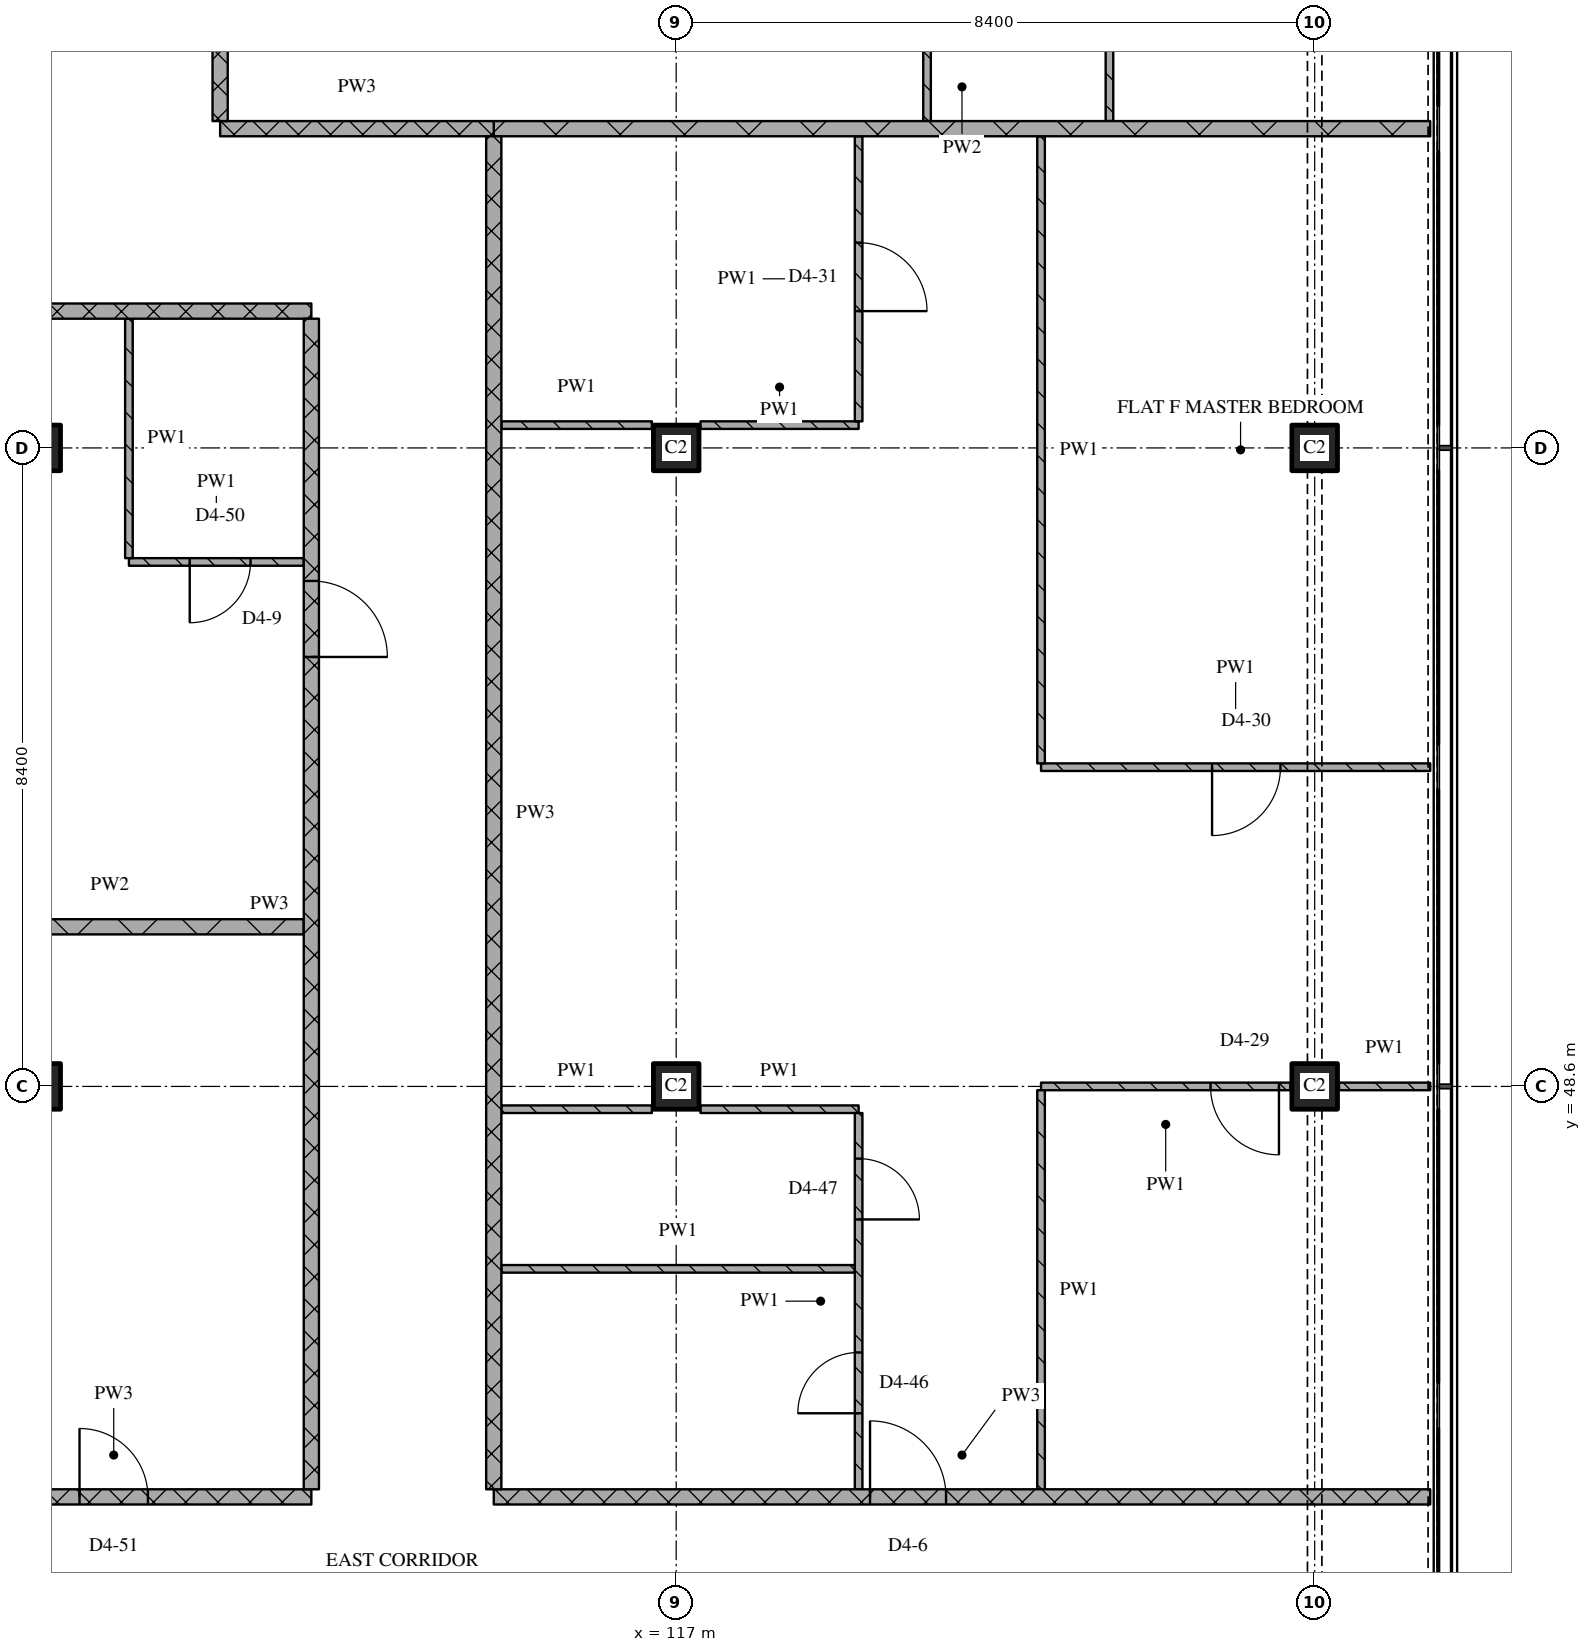
"""IFC4 building model, lengths in metres.
Left out: names, types, materials, properties, quantities, classifications, styles, units other than length and angle.
Written with IfcOpenShell. Run it as: python <this file> out.ifc"""

import sys

from ifc_helpers import new_model, si_unit, direction, frame, frame_2d, origin, origin_2d, place, context, subcontext, project, spatial, rectangle, extrude, element, fill, save


model = new_model("IFC4")
c1 = context("Model", 3, precision=1e-05, world=origin(), true_north=direction((0.0, 1.0)))
c2 = subcontext(c1, "Body", "Model", "MODEL_VIEW")
j1 = project(units=[si_unit("LENGTHUNIT", "METRE"), si_unit("PLANEANGLEUNIT", "RADIAN")], contexts=[c1])
p1 = place(None, origin())
s1 = spatial("IfcSite", under=j1, at=p1, CompositionType="ELEMENT")
p2 = place(p1, origin())
s2 = spatial("IfcBuilding", under=s1, at=p2, CompositionType="ELEMENT")
p3 = place(p2, frame((0.0, 0.0, 245.1)))
s3 = spatial("IfcBuildingStorey", under=s2, at=p3, CompositionType="ELEMENT", Elevation=245.1)
for number, where, z_axis, x_axis in (
    (1, (108.6, 48.6, 0.0), (0.0, 0.0, 1.0), (1.0, 0.0, 0.0)),
    (2, (108.6, 57.0, 0.0), (0.0, 0.0, 1.0), (1.0, 0.0, 0.0)),
    (3, (117.0, 48.6, 0.0), (0.0, 0.0, 1.0), (1.0, 0.0, 0.0)),
    (4, (117.0, 57.0, 0.0), (0.0, 0.0, 1.0), (1.0, 0.0, 0.0)),
    (5, (125.4, 48.6, 0.0), (0.0, 0.0, 1.0), (1.0, 0.0, 0.0)),
    (6, (125.4, 57.0, 0.0), (0.0, 0.0, 1.0), (1.0, 0.0, 0.0)),
):
    element("IfcColumn", number, at=place(p3, frame(where, z_axis=z_axis, x_axis=x_axis)), inside=s3, PredefinedType="COLUMN", context=c2, shape_type="SweptSolid", body=[
        extrude(rectangle(XDim=0.6, YDim=0.6, at=origin_2d()), origin(), (0.0, 0.0, 1.0), 3.6),
    ])
p4 = place(p3, frame((107.0, 43.2, 0.0), z_axis=(0.0, 0.0, 1.0), x_axis=(1.0, 0.0, 0.0)))
e7 = element("IfcWall", 7, at=p4, inside=s3, PredefinedType="PARTITIONING", context=c2, shape_type="SweptSolid", body=[
    extrude(rectangle(XDim=5.2, YDim=0.2, at=frame_2d((2.6, 0.0))), origin(), (0.0, 0.0, 1.0), 3.32),
])
p5 = place(p4, frame((2.15, 0.0, 0.0)))
e8 = element("IfcOpeningElement", 8, at=p5, cuts=e7, PredefinedType="OPENING", context=c2, shape_type="SweptSolid", body=[
    extrude(rectangle(XDim=0.9, YDim=2.1, at=frame_2d((0.45, 1.05))), frame((0.0, 0.11, 0.0), z_axis=(0.0, -1.0, 0.0), x_axis=(1.0, 0.0, 0.0)), (0.0, 0.0, 1.0), 0.22),
])
p6 = place(p3, frame((114.6, 43.2, 0.0), z_axis=(0.0, 0.0, 1.0), x_axis=(1.0, 0.0, 0.0)))
e9 = element("IfcWall", 9, at=p6, inside=s3, PredefinedType="PARTITIONING", context=c2, shape_type="SweptSolid", body=[
    extrude(rectangle(XDim=12.32, YDim=0.2, at=frame_2d((6.16, 0.0))), origin(), (0.0, 0.0, 1.0), 3.32),
])
p7 = place(p6, frame((4.95, 0.0, 0.0)))
e10 = element("IfcOpeningElement", 10, at=p7, cuts=e9, PredefinedType="OPENING", context=c2, shape_type="SweptSolid", body=[
    extrude(rectangle(XDim=1.0, YDim=2.1, at=frame_2d((0.5, 1.05))), frame((0.0, 0.11, 0.0), z_axis=(0.0, -1.0, 0.0), x_axis=(1.0, 0.0, 0.0)), (0.0, 0.0, 1.0), 0.22),
])
p8 = place(p3, frame((114.7, 46.2, 0.0), z_axis=(0.0, 0.0, 1.0), x_axis=(1.0, 0.0, 0.0)))
e11 = element("IfcWall", 11, at=p8, inside=s3, PredefinedType="PARTITIONING", context=c2, shape_type="SweptSolid", body=[
    extrude(rectangle(XDim=4.65, YDim=0.1, at=frame_2d((2.325, 0.0))), origin(), (0.0, 0.0, 1.0), 3.32),
])
p9 = place(p3, frame((114.7, 48.3, 0.0), z_axis=(0.0, 0.0, 1.0), x_axis=(1.0, 0.0, 0.0)))
e12 = element("IfcWall", 12, at=p9, inside=s3, PredefinedType="PARTITIONING", context=c2, shape_type="SweptSolid", body=[
    extrude(rectangle(XDim=1.98, YDim=0.1, at=frame_2d((0.99, 0.0))), origin(), (0.0, 0.0, 1.0), 3.32),
])
p10 = place(p3, frame((117.32, 48.3, 0.0), z_axis=(0.0, 0.0, 1.0), x_axis=(1.0, 0.0, 0.0)))
e13 = element("IfcWall", 13, at=p10, inside=s3, PredefinedType="PARTITIONING", context=c2, shape_type="SweptSolid", body=[
    extrude(rectangle(XDim=2.08, YDim=0.1, at=frame_2d((1.04, 0.0))), origin(), (0.0, 0.0, 1.0), 3.32),
])
p11 = place(p3, frame((125.08, 48.6, 0.0), z_axis=(0.0, 0.0, 1.0), x_axis=(-1.0, 0.0, 0.0)))
e14 = element("IfcWall", 14, at=p11, inside=s3, PredefinedType="PARTITIONING", context=c2, shape_type="SweptSolid", body=[
    extrude(rectangle(XDim=3.28, YDim=0.1, at=frame_2d((1.64, 0.0))), origin(), (0.0, 0.0, 1.0), 3.32),
])
p12 = place(p11, frame((0.15, 0.0, 0.0)))
e15 = element("IfcOpeningElement", 15, at=p12, cuts=e14, PredefinedType="OPENING", context=c2, shape_type="SweptSolid", body=[
    extrude(rectangle(XDim=0.9, YDim=2.1, at=frame_2d((0.45, 1.05))), frame((0.0, 0.06, 0.0), z_axis=(0.0, -1.0, 0.0), x_axis=(1.0, 0.0, 0.0)), (0.0, 0.0, 1.0), 0.12),
])
p13 = place(p3, frame((125.72, 48.6, 0.0), z_axis=(0.0, 0.0, 1.0), x_axis=(1.0, 0.0, 0.0)))
e16 = element("IfcWall", 16, at=p13, inside=s3, PredefinedType="PARTITIONING", context=c2, shape_type="SweptSolid", body=[
    extrude(rectangle(XDim=1.2, YDim=0.1, at=frame_2d((0.6, 0.0))), origin(), (0.0, 0.0, 1.0), 3.32),
])
p14 = place(p3, frame((107.0, 50.7, 0.0), z_axis=(0.0, 0.0, 1.0), x_axis=(1.0, 0.0, 0.0)))
e17 = element("IfcWall", 17, at=p14, inside=s3, PredefinedType="PARTITIONING", context=c2, shape_type="SweptSolid", body=[
    extrude(rectangle(XDim=5.1, YDim=0.2, at=frame_2d((2.55, 0.0))), origin(), (0.0, 0.0, 1.0), 3.32),
])
p15 = place(p3, frame((121.8, 52.8, 0.0), z_axis=(0.0, 0.0, 1.0), x_axis=(1.0, 0.0, 0.0)))
e18 = element("IfcWall", 18, at=p15, inside=s3, PredefinedType="PARTITIONING", context=c2, shape_type="SweptSolid", body=[
    extrude(rectangle(XDim=5.12, YDim=0.1, at=frame_2d((2.56, 0.0))), origin(), (0.0, 0.0, 1.0), 3.32),
])
p16 = place(p15, frame((2.25, 0.0, 0.0)))
e19 = element("IfcOpeningElement", 19, at=p16, cuts=e18, PredefinedType="OPENING", context=c2, shape_type="SweptSolid", body=[
    extrude(rectangle(XDim=0.9, YDim=2.1, at=frame_2d((0.45, 1.05))), frame((0.0, 0.06, 0.0), z_axis=(0.0, -1.0, 0.0), x_axis=(1.0, 0.0, 0.0)), (0.0, 0.0, 1.0), 0.12),
])
p17 = place(p3, frame((109.8, 55.5, 0.0), z_axis=(0.0, 0.0, 1.0), x_axis=(1.0, 0.0, 0.0)))
e20 = element("IfcWall", 20, at=p17, inside=s3, PredefinedType="PARTITIONING", context=c2, shape_type="SweptSolid", body=[
    extrude(rectangle(XDim=2.3, YDim=0.1, at=frame_2d((1.15, 0.0))), origin(), (0.0, 0.0, 1.0), 3.32),
])
p18 = place(p17, frame((0.8, 0.0, 0.0)))
e21 = element("IfcOpeningElement", 21, at=p18, cuts=e20, PredefinedType="OPENING", context=c2, shape_type="SweptSolid", body=[
    extrude(rectangle(XDim=0.8, YDim=2.1, at=frame_2d((0.4, 1.05))), frame((0.0, 0.06, 0.0), z_axis=(0.0, -1.0, 0.0), x_axis=(1.0, 0.0, 0.0)), (0.0, 0.0, 1.0), 0.12),
])
p19 = place(p3, frame((114.7, 57.3, 0.0), z_axis=(0.0, 0.0, 1.0), x_axis=(1.0, 0.0, 0.0)))
e22 = element("IfcWall", 22, at=p19, inside=s3, PredefinedType="PARTITIONING", context=c2, shape_type="SweptSolid", body=[
    extrude(rectangle(XDim=1.98, YDim=0.1, at=frame_2d((0.99, 0.0))), origin(), (0.0, 0.0, 1.0), 3.32),
])
p20 = place(p3, frame((117.32, 57.3, 0.0), z_axis=(0.0, 0.0, 1.0), x_axis=(1.0, 0.0, 0.0)))
e23 = element("IfcWall", 23, at=p20, inside=s3, PredefinedType="PARTITIONING", context=c2, shape_type="SweptSolid", body=[
    extrude(rectangle(XDim=2.08, YDim=0.1, at=frame_2d((1.04, 0.0))), origin(), (0.0, 0.0, 1.0), 3.32),
])
p21 = place(p3, frame((101.4, 58.8, 0.0), z_axis=(0.0, 0.0, 1.0), x_axis=(1.0, 0.0, 0.0)))
e24 = element("IfcWall", 24, at=p21, inside=s3, PredefinedType="PARTITIONING", context=c2, shape_type="SweptSolid", body=[
    extrude(rectangle(XDim=10.8, YDim=0.2, at=frame_2d((5.4, 0.0))), origin(), (0.0, 0.0, 1.0), 3.32),
])
p22 = place(p3, frame((111.0, 61.2, 0.0), z_axis=(0.0, 0.0, 1.0), x_axis=(1.0, 0.0, 0.0)))
e25 = element("IfcWall", 25, at=p22, inside=s3, PredefinedType="PARTITIONING", context=c2, shape_type="SweptSolid", body=[
    extrude(rectangle(XDim=3.6, YDim=0.2, at=frame_2d((1.8, 0.0))), origin(), (0.0, 0.0, 1.0), 3.32),
])
p23 = place(p3, frame((114.6, 61.2, 0.0), z_axis=(0.0, 0.0, 1.0), x_axis=(1.0, 0.0, 0.0)))
e26 = element("IfcWall", 26, at=p23, inside=s3, PredefinedType="PARTITIONING", context=c2, shape_type="SweptSolid", body=[
    extrude(rectangle(XDim=12.32, YDim=0.2, at=frame_2d((6.16, 0.0))), origin(), (0.0, 0.0, 1.0), 3.32),
])
p24 = place(p3, frame((109.8, 58.7, 0.0), z_axis=(0.0, 0.0, 1.0), x_axis=(0.0, -1.0, 0.0)))
e27 = element("IfcWall", 27, at=p24, inside=s3, PredefinedType="PARTITIONING", context=c2, shape_type="SweptSolid", body=[
    extrude(rectangle(XDim=3.15, YDim=0.1, at=frame_2d((1.575, 0.0))), origin(), (0.0, 0.0, 1.0), 3.32),
])
p25 = place(p3, frame((111.0, 75.32, 0.0), z_axis=(0.0, 0.0, 1.0), x_axis=(0.0, -1.0, 0.0)))
e28 = element("IfcWall", 28, at=p25, inside=s3, PredefinedType="PARTITIONING", context=c2, shape_type="SweptSolid", body=[
    extrude(rectangle(XDim=14.02, YDim=0.2, at=frame_2d((7.01, 0.0))), origin(), (0.0, 0.0, 1.0), 3.32),
])
p26 = place(p25, frame((8.07, 0.0, 0.0)))
e29 = element("IfcOpeningElement", 29, at=p26, cuts=e28, PredefinedType="OPENING", context=c2, shape_type="SweptSolid", body=[
    extrude(rectangle(XDim=1.0, YDim=2.1, at=frame_2d((0.5, 1.05))), frame((0.0, 0.11, 0.0), z_axis=(0.0, -1.0, 0.0), x_axis=(1.0, 0.0, 0.0)), (0.0, 0.0, 1.0), 0.22),
])
p27 = place(p3, frame((112.2, 43.3, 0.0), z_axis=(0.0, 0.0, 1.0), x_axis=(0.0, 1.0, 0.0)))
e30 = element("IfcWall", 30, at=p27, inside=s3, PredefinedType="PARTITIONING", context=c2, shape_type="SweptSolid", body=[
    extrude(rectangle(XDim=15.4, YDim=0.2, at=frame_2d((7.7, 0.0))), origin(), (0.0, 0.0, 1.0), 3.32),
])
p28 = place(p27, frame((10.95, 0.0, 0.0)))
e31 = element("IfcOpeningElement", 31, at=p28, cuts=e30, PredefinedType="OPENING", context=c2, shape_type="SweptSolid", body=[
    extrude(rectangle(XDim=1.0, YDim=2.1, at=frame_2d((0.5, 1.05))), frame((0.0, 0.11, 0.0), z_axis=(0.0, -1.0, 0.0), x_axis=(1.0, 0.0, 0.0)), (0.0, 0.0, 1.0), 0.22),
])
p29 = place(p3, frame((114.6, 61.1, 0.0), z_axis=(0.0, 0.0, 1.0), x_axis=(0.0, -1.0, 0.0)))
e32 = element("IfcWall", 32, at=p29, inside=s3, PredefinedType="PARTITIONING", context=c2, shape_type="SweptSolid", body=[
    extrude(rectangle(XDim=17.8, YDim=0.2, at=frame_2d((8.9, 0.0))), origin(), (0.0, 0.0, 1.0), 3.32),
])
p30 = place(p3, frame((119.4, 43.3, 0.0), z_axis=(0.0, 0.0, 1.0), x_axis=(0.0, 1.0, 0.0)))
e33 = element("IfcWall", 33, at=p30, inside=s3, PredefinedType="PARTITIONING", context=c2, shape_type="SweptSolid", body=[
    extrude(rectangle(XDim=4.95, YDim=0.1, at=frame_2d((2.475, 0.0))), origin(), (0.0, 0.0, 1.0), 3.32),
])
p31 = place(p30, frame((1.0, 0.0, 0.0)))
e34 = element("IfcOpeningElement", 34, at=p31, cuts=e33, PredefinedType="OPENING", context=c2, shape_type="SweptSolid", body=[
    extrude(rectangle(XDim=0.8, YDim=2.1, at=frame_2d((0.4, 1.05))), frame((0.0, 0.06, 0.0), z_axis=(0.0, -1.0, 0.0), x_axis=(1.0, 0.0, 0.0)), (0.0, 0.0, 1.0), 0.12),
])
p32 = place(p30, frame((3.55, 0.0, 0.0)))
e35 = element("IfcOpeningElement", 35, at=p32, cuts=e33, PredefinedType="OPENING", context=c2, shape_type="SweptSolid", body=[
    extrude(rectangle(XDim=0.8, YDim=2.1, at=frame_2d((0.4, 1.05))), frame((0.0, 0.06, 0.0), z_axis=(0.0, -1.0, 0.0), x_axis=(1.0, 0.0, 0.0)), (0.0, 0.0, 1.0), 0.12),
])
p33 = place(p3, frame((119.4, 57.35, 0.0), z_axis=(0.0, 0.0, 1.0), x_axis=(0.0, 1.0, 0.0)))
e36 = element("IfcWall", 36, at=p33, inside=s3, PredefinedType="PARTITIONING", context=c2, shape_type="SweptSolid", body=[
    extrude(rectangle(XDim=3.75, YDim=0.1, at=frame_2d((1.875, 0.0))), origin(), (0.0, 0.0, 1.0), 3.32),
])
p34 = place(p33, frame((1.45, 0.0, 0.0)))
e37 = element("IfcOpeningElement", 37, at=p34, cuts=e36, PredefinedType="OPENING", context=c2, shape_type="SweptSolid", body=[
    extrude(rectangle(XDim=0.9, YDim=2.1, at=frame_2d((0.45, 1.05))), frame((0.0, 0.06, 0.0), z_axis=(0.0, -1.0, 0.0), x_axis=(1.0, 0.0, 0.0)), (0.0, 0.0, 1.0), 0.12),
])
p35 = place(p3, frame((120.3, 61.3, 0.0), z_axis=(0.0, 0.0, 1.0), x_axis=(0.0, 1.0, 0.0)))
e38 = element("IfcWall", 38, at=p35, inside=s3, PredefinedType="PARTITIONING", context=c2, shape_type="SweptSolid", body=[
    extrude(rectangle(XDim=4.65, YDim=0.1, at=frame_2d((2.325, 0.0))), origin(), (0.0, 0.0, 1.0), 3.32),
])
p36 = place(p35, frame((0.925, 0.0, 0.0)))
e39 = element("IfcOpeningElement", 39, at=p36, cuts=e38, PredefinedType="OPENING", context=c2, shape_type="SweptSolid", body=[
    extrude(rectangle(XDim=0.8, YDim=2.1, at=frame_2d((0.4, 1.05))), frame((0.0, 0.06, 0.0), z_axis=(0.0, -1.0, 0.0), x_axis=(1.0, 0.0, 0.0)), (0.0, 0.0, 1.0), 0.12),
])
p37 = place(p35, frame((3.275, 0.0, 0.0)))
e40 = element("IfcOpeningElement", 40, at=p37, cuts=e38, PredefinedType="OPENING", context=c2, shape_type="SweptSolid", body=[
    extrude(rectangle(XDim=0.9, YDim=2.1, at=frame_2d((0.45, 1.05))), frame((0.0, 0.06, 0.0), z_axis=(0.0, -1.0, 0.0), x_axis=(1.0, 0.0, 0.0)), (0.0, 0.0, 1.0), 0.12),
])
p38 = place(p3, frame((121.8, 48.55, 0.0), z_axis=(0.0, 0.0, 1.0), x_axis=(0.0, -1.0, 0.0)))
e41 = element("IfcWall", 41, at=p38, inside=s3, PredefinedType="PARTITIONING", context=c2, shape_type="SweptSolid", body=[
    extrude(rectangle(XDim=5.25, YDim=0.1, at=frame_2d((2.625, 0.0))), origin(), (0.0, 0.0, 1.0), 3.32),
])
for number, where, z_axis, x_axis in (
    (42, (121.8, 61.1, 0.0), (0.0, 0.0, 1.0), (0.0, -1.0, 0.0)),
    (43, (122.7, 69.55, 0.0), (0.0, 0.0, 1.0), (0.0, -1.0, 0.0)),
):
    element("IfcWall", number, at=place(p3, frame(where, z_axis=z_axis, x_axis=x_axis)), inside=s3, PredefinedType="PARTITIONING", context=c2, shape_type="SweptSolid", body=[
        extrude(rectangle(XDim=8.25, YDim=0.1, at=frame_2d((4.125, 0.0))), origin(), (0.0, 0.0, 1.0), 3.32),
    ])
p39 = place(p5, origin())
e44 = element("IfcDoor", 44, at=p39, inside=s3, OperationType="SINGLE_SWING_LEFT", PredefinedType="DOOR", context=c2, shape_type="SweptSolid", body=[
    extrude(rectangle(XDim=0.9, YDim=2.1, at=frame_2d((0.45, 1.05))), frame((0.0, 0.025, 0.0), z_axis=(0.0, -1.0, 0.0), x_axis=(1.0, 0.0, 0.0)), (0.0, 0.0, 1.0), 0.05),
])
fill(e8, e44)
p40 = place(p7, origin())
e45 = element("IfcDoor", 45, at=p40, inside=s3, OperationType="SINGLE_SWING_LEFT", PredefinedType="DOOR", context=c2, shape_type="SweptSolid", body=[
    extrude(rectangle(XDim=1.0, YDim=2.1, at=frame_2d((0.5, 1.05))), frame((0.0, 0.025, 0.0), z_axis=(0.0, -1.0, 0.0), x_axis=(1.0, 0.0, 0.0)), (0.0, 0.0, 1.0), 0.05),
])
fill(e10, e45)
p41 = place(p12, origin())
e46 = element("IfcDoor", 46, at=p41, inside=s3, OperationType="SINGLE_SWING_LEFT", PredefinedType="DOOR", context=c2, shape_type="SweptSolid", body=[
    extrude(rectangle(XDim=0.9, YDim=2.1, at=frame_2d((0.45, 1.05))), frame((0.0, 0.025, 0.0), z_axis=(0.0, -1.0, 0.0), x_axis=(1.0, 0.0, 0.0)), (0.0, 0.0, 1.0), 0.05),
])
fill(e15, e46)
p42 = place(p16, origin())
e47 = element("IfcDoor", 47, at=p42, inside=s3, OperationType="SINGLE_SWING_RIGHT", PredefinedType="DOOR", context=c2, shape_type="SweptSolid", body=[
    extrude(rectangle(XDim=0.9, YDim=2.1, at=frame_2d((0.45, 1.05))), frame((0.0, 0.025, 0.0), z_axis=(0.0, -1.0, 0.0), x_axis=(1.0, 0.0, 0.0)), (0.0, 0.0, 1.0), 0.05),
])
fill(e19, e47)
p43 = place(p18, origin())
e48 = element("IfcDoor", 48, at=p43, inside=s3, OperationType="SINGLE_SWING_RIGHT", PredefinedType="DOOR", context=c2, shape_type="SweptSolid", body=[
    extrude(rectangle(XDim=0.8, YDim=2.1, at=frame_2d((0.4, 1.05))), frame((0.0, 0.025, 0.0), z_axis=(0.0, -1.0, 0.0), x_axis=(1.0, 0.0, 0.0)), (0.0, 0.0, 1.0), 0.05),
])
fill(e21, e48)
p44 = place(p28, origin())
e49 = element("IfcDoor", 49, at=p44, inside=s3, OperationType="SINGLE_SWING_RIGHT", PredefinedType="DOOR", context=c2, shape_type="SweptSolid", body=[
    extrude(rectangle(XDim=1.0, YDim=2.1, at=frame_2d((0.5, 1.05))), frame((0.0, 0.025, 0.0), z_axis=(0.0, -1.0, 0.0), x_axis=(1.0, 0.0, 0.0)), (0.0, 0.0, 1.0), 0.05),
])
fill(e31, e49)
p45 = place(p31, origin())
e50 = element("IfcDoor", 50, at=p45, inside=s3, OperationType="SINGLE_SWING_LEFT", PredefinedType="DOOR", context=c2, shape_type="SweptSolid", body=[
    extrude(rectangle(XDim=0.8, YDim=2.1, at=frame_2d((0.4, 1.05))), frame((0.0, 0.025, 0.0), z_axis=(0.0, -1.0, 0.0), x_axis=(1.0, 0.0, 0.0)), (0.0, 0.0, 1.0), 0.05),
])
fill(e34, e50)
p46 = place(p32, origin())
e51 = element("IfcDoor", 51, at=p46, inside=s3, OperationType="SINGLE_SWING_RIGHT", PredefinedType="DOOR", context=c2, shape_type="SweptSolid", body=[
    extrude(rectangle(XDim=0.8, YDim=2.1, at=frame_2d((0.4, 1.05))), frame((0.0, 0.025, 0.0), z_axis=(0.0, -1.0, 0.0), x_axis=(1.0, 0.0, 0.0)), (0.0, 0.0, 1.0), 0.05),
])
fill(e35, e51)
p47 = place(p34, origin())
e52 = element("IfcDoor", 52, at=p47, inside=s3, OperationType="SINGLE_SWING_RIGHT", PredefinedType="DOOR", context=c2, shape_type="SweptSolid", body=[
    extrude(rectangle(XDim=0.9, YDim=2.1, at=frame_2d((0.45, 1.05))), frame((0.0, 0.025, 0.0), z_axis=(0.0, -1.0, 0.0), x_axis=(1.0, 0.0, 0.0)), (0.0, 0.0, 1.0), 0.05),
])
fill(e37, e52)
save(model, sys.argv[1])
